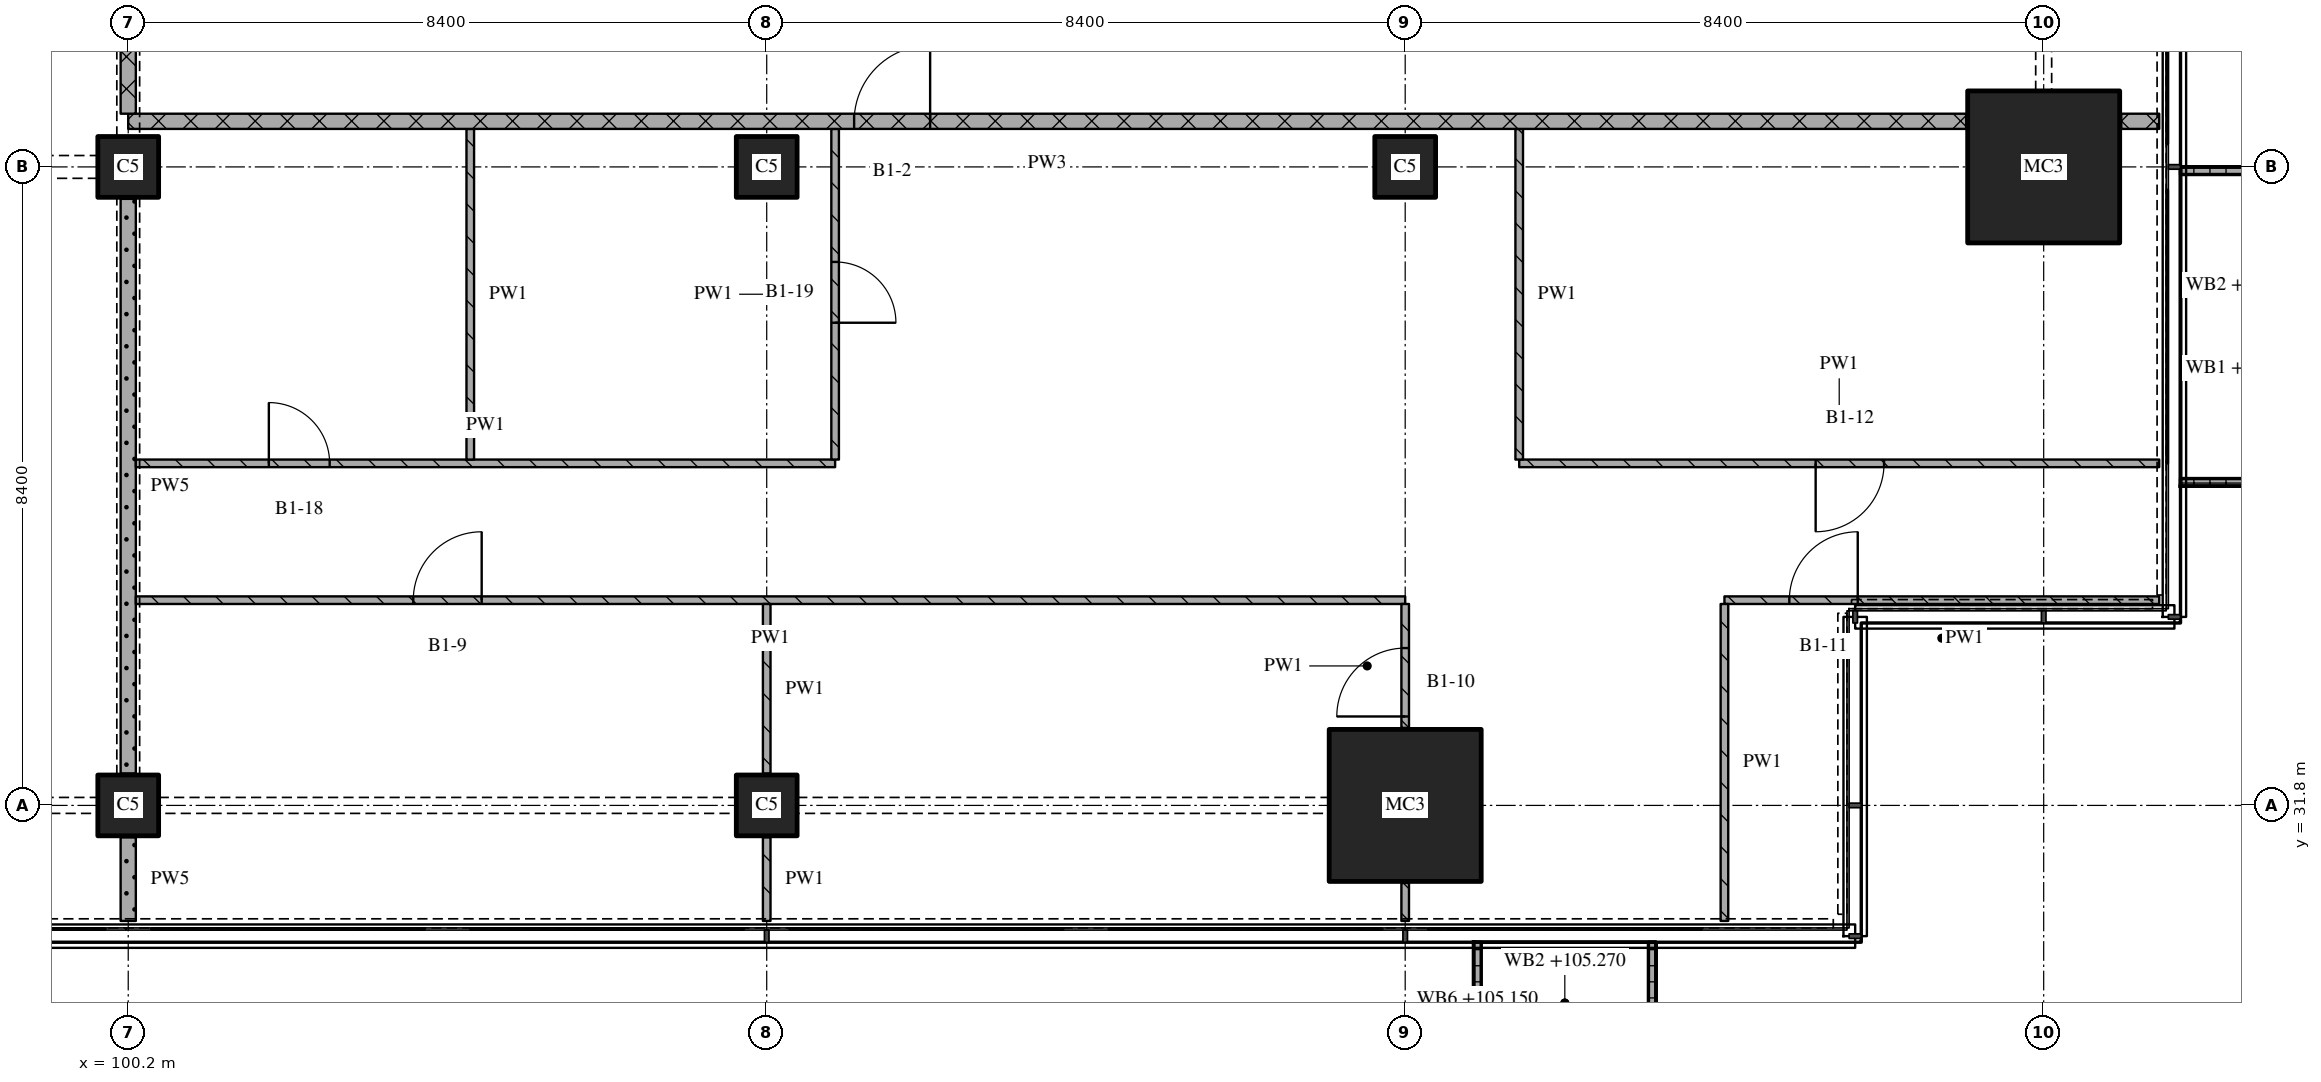
"""IFC4 building model, lengths in metres.
Left out: names, types, materials, properties, quantities, classifications, styles, units other than length and angle.
Written with IfcOpenShell. Run it as: python <this file> out.ifc"""

import sys

from ifc_helpers import new_model, si_unit, direction, frame, frame_2d, origin, origin_2d, place, context, subcontext, project, spatial, polyline, rectangle, outline, extrude, element, fill, save


model = new_model("IFC4")
c1 = context("Model", 3, precision=1e-05, world=origin(), true_north=direction((0.0, 1.0)))
c2 = subcontext(c1, "Body", "Model", "MODEL_VIEW")
j1 = project(units=[si_unit("LENGTHUNIT", "METRE"), si_unit("PLANEANGLEUNIT", "RADIAN")], contexts=[c1])
p1 = place(None, origin())
s1 = spatial("IfcSite", under=j1, at=p1, CompositionType="ELEMENT")
p2 = place(p1, origin())
s2 = spatial("IfcBuilding", under=s1, at=p2, CompositionType="ELEMENT")
p3 = place(p2, frame((0.0, 0.0, 102.45)))
s3 = spatial("IfcBuildingStorey", under=s2, at=p3, CompositionType="ELEMENT", Elevation=102.45)
for number, where, z_axis, x_axis in (
    (1, (100.2, 31.8, 0.0), (0.0, 0.0, 1.0), (1.0, 0.0, 0.0)),
    (2, (100.2, 40.2, 0.0), (0.0, 0.0, 1.0), (1.0, 0.0, 0.0)),
    (3, (108.6, 31.8, 0.0), (0.0, 0.0, 1.0), (1.0, 0.0, 0.0)),
    (4, (108.6, 40.2, 0.0), (0.0, 0.0, 1.0), (1.0, 0.0, 0.0)),
):
    element("IfcColumn", number, at=place(p3, frame(where, z_axis=z_axis, x_axis=x_axis)), inside=s3, PredefinedType="COLUMN", context=c2, shape_type="SweptSolid", body=[
        extrude(rectangle(XDim=0.8, YDim=0.8, at=origin_2d()), origin(), (0.0, 0.0, 1.0), 3.6),
    ])
p4 = place(p3, frame((117.0, 31.8, 0.0), z_axis=(0.0, 0.0, 1.0), x_axis=(1.0, 0.0, 0.0)))
e5 = element("IfcColumn", 5, at=p4, inside=s3, PredefinedType="COLUMN", context=c2, shape_type="SweptSolid", body=[
    extrude(rectangle(XDim=2.0, YDim=2.0, at=origin_2d()), origin(), (0.0, 0.0, 1.0), 3.6),
])
p5 = place(p3, frame((117.0, 40.2, 0.0), z_axis=(0.0, 0.0, 1.0), x_axis=(1.0, 0.0, 0.0)))
e6 = element("IfcColumn", 6, at=p5, inside=s3, PredefinedType="COLUMN", context=c2, shape_type="SweptSolid", body=[
    extrude(rectangle(XDim=0.8, YDim=0.8, at=origin_2d()), origin(), (0.0, 0.0, 1.0), 3.6),
])
p6 = place(p3, frame((125.4, 40.2, 0.0), z_axis=(0.0, 0.0, 1.0), x_axis=(1.0, 0.0, 0.0)))
e7 = element("IfcColumn", 7, at=p6, inside=s3, PredefinedType="COLUMN", context=c2, shape_type="SweptSolid", body=[
    extrude(rectangle(XDim=2.0, YDim=2.0, at=origin_2d()), origin(), (0.0, 0.0, 1.0), 3.6),
])
p7 = place(p3, origin())
e8 = element("IfcWall", 8, at=p7, inside=s3, PredefinedType="SOLIDWALL", context=c2, shape_type="SweptSolid", body=[
    extrude(outline(polyline([(117.9, 30.0), (118.0, 30.0), (118.0, 28.5), (120.2, 28.5), (120.2, 30.0), (120.3, 30.0), (120.3, 28.4), (117.9, 28.4), (117.9, 30.0)])), origin(), (0.0, 0.0, 1.0), 1.0),
])
p8 = place(p3, origin())
e9 = element("IfcWall", 9, at=p8, inside=s3, PredefinedType="SOLIDWALL", context=c2, shape_type="SweptSolid", body=[
    extrude(outline(polyline([(127.2, 36.0), (127.2, 36.1), (128.833, 36.1), (128.833, 40.1), (127.2, 40.1), (127.2, 40.2), (128.933, 40.2), (128.933, 36.0), (127.2, 36.0)])), origin(), (0.0, 0.0, 1.0), 1.0),
])
p9 = place(p3, frame((117.0, 34.5, 0.0), z_axis=(0.0, 0.0, 1.0), x_axis=(-1.0, 0.0, 0.0)))
e10 = element("IfcWall", 10, at=p9, inside=s3, PredefinedType="PARTITIONING", context=c2, shape_type="SweptSolid", body=[
    extrude(rectangle(XDim=16.7, YDim=0.1, at=frame_2d((8.35, 0.0))), origin(), (0.0, 0.0, 1.0), 3.32),
])
p10 = place(p9, frame((12.15, 0.0, 0.0)))
e11 = element("IfcOpeningElement", 11, at=p10, cuts=e10, PredefinedType="OPENING", context=c2, shape_type="SweptSolid", body=[
    extrude(rectangle(XDim=0.9, YDim=2.1, at=frame_2d((0.45, 1.05))), frame((0.0, 0.06, 0.0), z_axis=(0.0, -1.0, 0.0), x_axis=(1.0, 0.0, 0.0)), (0.0, 0.0, 1.0), 0.12),
])
p11 = place(p3, frame((126.92, 34.5, 0.0), z_axis=(0.0, 0.0, 1.0), x_axis=(-1.0, 0.0, 0.0)))
e12 = element("IfcWall", 12, at=p11, inside=s3, PredefinedType="PARTITIONING", context=c2, shape_type="SweptSolid", body=[
    extrude(rectangle(XDim=5.72, YDim=0.1, at=frame_2d((2.86, 0.0))), origin(), (0.0, 0.0, 1.0), 3.32),
])
p12 = place(p11, frame((3.966, 0.0, 0.0)))
e13 = element("IfcOpeningElement", 13, at=p12, cuts=e12, PredefinedType="OPENING", context=c2, shape_type="SweptSolid", body=[
    extrude(rectangle(XDim=0.9, YDim=2.1, at=frame_2d((0.45, 1.05))), frame((0.0, 0.06, 0.0), z_axis=(0.0, -1.0, 0.0), x_axis=(1.0, 0.0, 0.0)), (0.0, 0.0, 1.0), 0.12),
])
p13 = place(p3, frame((100.3, 36.3, 0.0), z_axis=(0.0, 0.0, 1.0), x_axis=(1.0, 0.0, 0.0)))
e14 = element("IfcWall", 14, at=p13, inside=s3, PredefinedType="PARTITIONING", context=c2, shape_type="SweptSolid", body=[
    extrude(rectangle(XDim=9.2, YDim=0.1, at=frame_2d((4.6, 0.0))), origin(), (0.0, 0.0, 1.0), 3.32),
])
p14 = place(p13, frame((1.75, 0.0, 0.0)))
e15 = element("IfcOpeningElement", 15, at=p14, cuts=e14, PredefinedType="OPENING", context=c2, shape_type="SweptSolid", body=[
    extrude(rectangle(XDim=0.8, YDim=2.1, at=frame_2d((0.4, 1.05))), frame((0.0, 0.06, 0.0), z_axis=(0.0, -1.0, 0.0), x_axis=(1.0, 0.0, 0.0)), (0.0, 0.0, 1.0), 0.12),
])
p15 = place(p3, frame((118.5, 36.3, 0.0), z_axis=(0.0, 0.0, 1.0), x_axis=(1.0, 0.0, 0.0)))
e16 = element("IfcWall", 16, at=p15, inside=s3, PredefinedType="PARTITIONING", context=c2, shape_type="SweptSolid", body=[
    extrude(rectangle(XDim=8.42, YDim=0.1, at=frame_2d((4.21, 0.0))), origin(), (0.0, 0.0, 1.0), 3.32),
])
p16 = place(p15, frame((3.9, 0.0, 0.0)))
e17 = element("IfcOpeningElement", 17, at=p16, cuts=e16, PredefinedType="OPENING", context=c2, shape_type="SweptSolid", body=[
    extrude(rectangle(XDim=0.9, YDim=2.1, at=frame_2d((0.45, 1.05))), frame((0.0, 0.06, 0.0), z_axis=(0.0, -1.0, 0.0), x_axis=(1.0, 0.0, 0.0)), (0.0, 0.0, 1.0), 0.12),
])
p17 = place(p3, frame((124.38, 40.8, 0.0), z_axis=(0.0, 0.0, 1.0), x_axis=(-1.0, 0.0, 0.0)))
e18 = element("IfcWall", 18, at=p17, inside=s3, PredefinedType="PARTITIONING", context=c2, shape_type="SweptSolid", body=[
    extrude(rectangle(XDim=24.18, YDim=0.2, at=frame_2d((12.09, 0.0))), origin(), (0.0, 0.0, 1.0), 3.32),
])
p18 = place(p17, frame((13.63, 0.0, 0.0)))
e19 = element("IfcOpeningElement", 19, at=p18, cuts=e18, PredefinedType="OPENING", context=c2, shape_type="SweptSolid", body=[
    extrude(rectangle(XDim=1.0, YDim=2.1, at=frame_2d((0.5, 1.05))), frame((0.0, 0.11, 0.0), z_axis=(0.0, -1.0, 0.0), x_axis=(1.0, 0.0, 0.0)), (0.0, 0.0, 1.0), 0.22),
])
p19 = place(p3, frame((126.42, 40.8, 0.0), z_axis=(0.0, 0.0, 1.0), x_axis=(1.0, 0.0, 0.0)))
e20 = element("IfcWall", 20, at=p19, inside=s3, PredefinedType="PARTITIONING", context=c2, shape_type="SweptSolid", body=[
    extrude(rectangle(XDim=0.5, YDim=0.2, at=frame_2d((0.25, 0.0))), origin(), (0.0, 0.0, 1.0), 3.32),
])
p20 = place(p3, frame((100.2, 43.1, 0.0), z_axis=(0.0, 0.0, 1.0), x_axis=(0.0, -1.0, 0.0)))
e21 = element("IfcWall", 21, at=p20, inside=s3, PredefinedType="PARTITIONING", context=c2, shape_type="SweptSolid", body=[
    extrude(rectangle(XDim=2.2, YDim=0.2, at=frame_2d((1.1, 0.0))), origin(), (0.0, 0.0, 1.0), 2.43),
])
p21 = place(p3, frame((100.2, 31.38, 0.0), z_axis=(0.0, 0.0, 1.0), x_axis=(0.0, -1.0, 0.0)))
e22 = element("IfcWall", 22, at=p21, inside=s3, PredefinedType="PARTITIONING", context=c2, shape_type="SweptSolid", body=[
    extrude(rectangle(XDim=1.1, YDim=0.2, at=frame_2d((0.55, 0.0))), origin(), (0.0, 0.0, 1.0), 3.32),
])
p22 = place(p3, frame((100.2, 39.78, 0.0), z_axis=(0.0, 0.0, 1.0), x_axis=(0.0, -1.0, 0.0)))
e23 = element("IfcWall", 23, at=p22, inside=s3, PredefinedType="PARTITIONING", context=c2, shape_type="SweptSolid", body=[
    extrude(rectangle(XDim=7.56, YDim=0.2, at=frame_2d((3.78, 0.0))), origin(), (0.0, 0.0, 1.0), 2.83),
])
p23 = place(p3, frame((104.7, 40.7, 0.0), z_axis=(0.0, 0.0, 1.0), x_axis=(0.0, -1.0, 0.0)))
e24 = element("IfcWall", 24, at=p23, inside=s3, PredefinedType="PARTITIONING", context=c2, shape_type="SweptSolid", body=[
    extrude(rectangle(XDim=4.35, YDim=0.1, at=frame_2d((2.175, 0.0))), origin(), (0.0, 0.0, 1.0), 3.32),
])
p24 = place(p3, frame((108.6, 31.38, 0.0), z_axis=(0.0, 0.0, 1.0), x_axis=(0.0, -1.0, 0.0)))
e25 = element("IfcWall", 25, at=p24, inside=s3, PredefinedType="PARTITIONING", context=c2, shape_type="SweptSolid", body=[
    extrude(rectangle(XDim=1.1, YDim=0.1, at=frame_2d((0.55, 0.0))), origin(), (0.0, 0.0, 1.0), 3.32),
])
p25 = place(p3, frame((108.6, 34.45, 0.0), z_axis=(0.0, 0.0, 1.0), x_axis=(0.0, -1.0, 0.0)))
e26 = element("IfcWall", 26, at=p25, inside=s3, PredefinedType="PARTITIONING", context=c2, shape_type="SweptSolid", body=[
    extrude(rectangle(XDim=2.23, YDim=0.1, at=frame_2d((1.115, 0.0))), origin(), (0.0, 0.0, 1.0), 3.32),
])
p26 = place(p3, frame((109.5, 36.35, 0.0), z_axis=(0.0, 0.0, 1.0), x_axis=(0.0, 1.0, 0.0)))
e27 = element("IfcWall", 27, at=p26, inside=s3, PredefinedType="PARTITIONING", context=c2, shape_type="SweptSolid", body=[
    extrude(rectangle(XDim=4.35, YDim=0.1, at=frame_2d((2.175, 0.0))), origin(), (0.0, 0.0, 1.0), 3.32),
])
p27 = place(p26, frame((1.8, 0.0, 0.0)))
e28 = element("IfcOpeningElement", 28, at=p27, cuts=e27, PredefinedType="OPENING", context=c2, shape_type="SweptSolid", body=[
    extrude(rectangle(XDim=0.8, YDim=2.1, at=frame_2d((0.4, 1.05))), frame((0.0, 0.06, 0.0), z_axis=(0.0, -1.0, 0.0), x_axis=(1.0, 0.0, 0.0)), (0.0, 0.0, 1.0), 0.12),
])
p28 = place(p3, frame((117.0, 30.78, 0.0), z_axis=(0.0, 0.0, 1.0), x_axis=(0.0, -1.0, 0.0)))
e29 = element("IfcWall", 29, at=p28, inside=s3, PredefinedType="PARTITIONING", context=c2, shape_type="SweptSolid", body=[
    extrude(rectangle(XDim=0.5, YDim=0.1, at=frame_2d((0.25, 0.0))), origin(), (0.0, 0.0, 1.0), 3.32),
])
p29 = place(p3, frame((117.0, 32.82, 0.0), z_axis=(0.0, 0.0, 1.0), x_axis=(0.0, 1.0, 0.0)))
e30 = element("IfcWall", 30, at=p29, inside=s3, PredefinedType="PARTITIONING", context=c2, shape_type="SweptSolid", body=[
    extrude(rectangle(XDim=1.63, YDim=0.1, at=frame_2d((0.815, 0.0))), origin(), (0.0, 0.0, 1.0), 3.32),
])
p30 = place(p29, frame((0.15, 0.0, 0.0)))
e31 = element("IfcOpeningElement", 31, at=p30, cuts=e30, PredefinedType="OPENING", context=c2, shape_type="SweptSolid", body=[
    extrude(rectangle(XDim=0.9, YDim=2.1, at=frame_2d((0.45, 1.05))), frame((0.0, 0.06, 0.0), z_axis=(0.0, -1.0, 0.0), x_axis=(1.0, 0.0, 0.0)), (0.0, 0.0, 1.0), 0.12),
])
p31 = place(p3, frame((118.5, 40.7, 0.0), z_axis=(0.0, 0.0, 1.0), x_axis=(0.0, -1.0, 0.0)))
e32 = element("IfcWall", 32, at=p31, inside=s3, PredefinedType="PARTITIONING", context=c2, shape_type="SweptSolid", body=[
    extrude(rectangle(XDim=4.35, YDim=0.1, at=frame_2d((2.175, 0.0))), origin(), (0.0, 0.0, 1.0), 3.32),
])
p32 = place(p3, frame((121.2, 34.45, 0.0), z_axis=(0.0, 0.0, 1.0), x_axis=(0.0, -1.0, 0.0)))
e33 = element("IfcWall", 33, at=p32, inside=s3, PredefinedType="PARTITIONING", context=c2, shape_type="SweptSolid", body=[
    extrude(rectangle(XDim=4.17, YDim=0.1, at=frame_2d((2.085, 0.0))), origin(), (0.0, 0.0, 1.0), 3.32),
])
p33 = place(p10, origin())
e34 = element("IfcDoor", 34, at=p33, inside=s3, OperationType="SINGLE_SWING_RIGHT", PredefinedType="DOOR", context=c2, shape_type="SweptSolid", body=[
    extrude(rectangle(XDim=0.9, YDim=2.1, at=frame_2d((0.45, 1.05))), frame((0.0, 0.025, 0.0), z_axis=(0.0, -1.0, 0.0), x_axis=(1.0, 0.0, 0.0)), (0.0, 0.0, 1.0), 0.05),
])
fill(e11, e34)
p34 = place(p12, origin())
e35 = element("IfcDoor", 35, at=p34, inside=s3, OperationType="SINGLE_SWING_RIGHT", PredefinedType="DOOR", context=c2, shape_type="SweptSolid", body=[
    extrude(rectangle(XDim=0.9, YDim=2.1, at=frame_2d((0.45, 1.05))), frame((0.0, 0.025, 0.0), z_axis=(0.0, -1.0, 0.0), x_axis=(1.0, 0.0, 0.0)), (0.0, 0.0, 1.0), 0.05),
])
fill(e13, e35)
p35 = place(p14, origin())
e36 = element("IfcDoor", 36, at=p35, inside=s3, OperationType="SINGLE_SWING_LEFT", PredefinedType="DOOR", context=c2, shape_type="SweptSolid", body=[
    extrude(rectangle(XDim=0.8, YDim=2.1, at=frame_2d((0.4, 1.05))), frame((0.0, 0.025, 0.0), z_axis=(0.0, -1.0, 0.0), x_axis=(1.0, 0.0, 0.0)), (0.0, 0.0, 1.0), 0.05),
])
fill(e15, e36)
p36 = place(p16, origin())
e37 = element("IfcDoor", 37, at=p36, inside=s3, OperationType="SINGLE_SWING_RIGHT", PredefinedType="DOOR", context=c2, shape_type="SweptSolid", body=[
    extrude(rectangle(XDim=0.9, YDim=2.1, at=frame_2d((0.45, 1.05))), frame((0.0, 0.025, 0.0), z_axis=(0.0, -1.0, 0.0), x_axis=(1.0, 0.0, 0.0)), (0.0, 0.0, 1.0), 0.05),
])
fill(e17, e37)
p37 = place(p18, origin())
e38 = element("IfcDoor", 38, at=p37, inside=s3, OperationType="SINGLE_SWING_RIGHT", PredefinedType="DOOR", context=c2, shape_type="SweptSolid", body=[
    extrude(rectangle(XDim=1.0, YDim=2.1, at=frame_2d((0.5, 1.05))), frame((0.0, 0.025, 0.0), z_axis=(0.0, -1.0, 0.0), x_axis=(1.0, 0.0, 0.0)), (0.0, 0.0, 1.0), 0.05),
])
fill(e19, e38)
p38 = place(p27, origin())
e39 = element("IfcDoor", 39, at=p38, inside=s3, OperationType="SINGLE_SWING_RIGHT", PredefinedType="DOOR", context=c2, shape_type="SweptSolid", body=[
    extrude(rectangle(XDim=0.8, YDim=2.1, at=frame_2d((0.4, 1.05))), frame((0.0, 0.025, 0.0), z_axis=(0.0, -1.0, 0.0), x_axis=(1.0, 0.0, 0.0)), (0.0, 0.0, 1.0), 0.05),
])
fill(e28, e39)
p39 = place(p30, origin())
e40 = element("IfcDoor", 40, at=p39, inside=s3, OperationType="SINGLE_SWING_LEFT", PredefinedType="DOOR", context=c2, shape_type="SweptSolid", body=[
    extrude(rectangle(XDim=0.9, YDim=2.1, at=frame_2d((0.45, 1.05))), frame((0.0, 0.025, 0.0), z_axis=(0.0, -1.0, 0.0), x_axis=(1.0, 0.0, 0.0)), (0.0, 0.0, 1.0), 0.05),
])
fill(e31, e40)
save(model, sys.argv[1])
